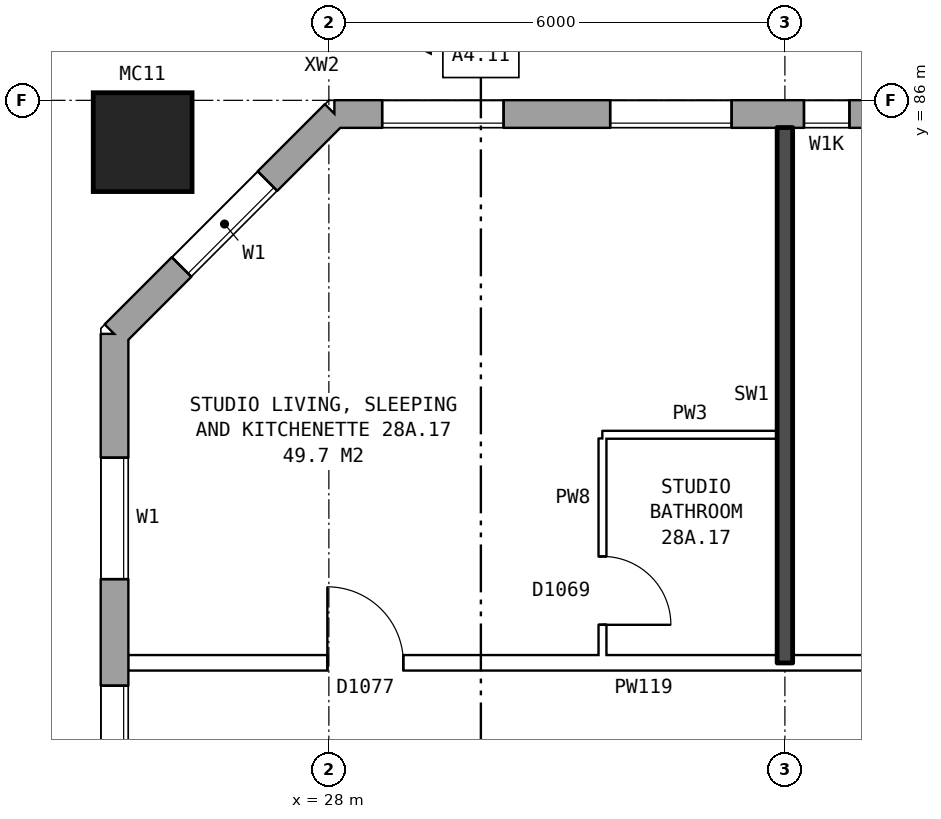
"""IFC4 building model, lengths in metres.
Left out: names, types, materials, properties, quantities, classifications, styles, units other than length and angle.
Written with IfcOpenShell. Run it as: python <this file> out.ifc"""

import sys

from ifc_helpers import new_model, si_unit, direction, frame, frame_2d, origin, origin_2d, place, context, subcontext, project, spatial, rectangle, hollow_rectangle, extrude, element, fill, save


model = new_model("IFC4")
c1 = context("Model", 3, precision=1e-05, world=origin(), true_north=direction((0.0, 1.0)))
c2 = subcontext(c1, "Body", "Model", "MODEL_VIEW")
j1 = project(units=[si_unit("LENGTHUNIT", "METRE"), si_unit("PLANEANGLEUNIT", "RADIAN")], contexts=[c1])
p1 = place(None, origin())
s1 = spatial("IfcSite", under=j1, at=p1, CompositionType="ELEMENT")
p2 = place(p1, origin())
s2 = spatial("IfcBuilding", under=s1, at=p2, CompositionType="ELEMENT")
p3 = place(p2, frame((0.0, 0.0, 102.6)))
s3 = spatial("IfcBuildingStorey", under=s2, at=p3, CompositionType="ELEMENT", Elevation=102.6)
p4 = place(p3, frame((25.55, 85.45, 0.0), z_axis=(0.0, 0.0, 1.0), x_axis=(1.0, 0.0, 0.0)))
e1 = element("IfcColumn", 1, at=p4, inside=s3, PredefinedType="COLUMN", context=c2, shape_type="SweptSolid", body=[
    extrude(hollow_rectangle(XDim=1.3, YDim=1.3, WallThickness=0.07, at=origin_2d()), origin(), (0.0, 0.0, 1.0), 3.1),
])
p5 = place(p3, frame((72.925, 85.82, 0.0), z_axis=(0.0, 0.0, 1.0), x_axis=(-1.0, 0.0, 0.0)))
e2 = element("IfcWall", 2, at=p5, inside=s3, PredefinedType="STANDARD", context=c2, shape_type="SweptSolid", body=[
    extrude(rectangle(XDim=44.851, YDim=0.36, at=frame_2d((22.425, 0.0))), origin(), (0.0, 0.0, 1.0), 2.85),
])
p6 = place(p5, frame((0.625, 0.0, 0.8)))
e3 = element("IfcOpeningElement", 3, at=p6, cuts=e2, PredefinedType="OPENING", context=c2, shape_type="SweptSolid", body=[
    extrude(rectangle(XDim=1.6, YDim=1.8, at=frame_2d((0.8, 0.9))), frame((0.0, 0.19, 0.0), z_axis=(0.0, -1.0, 0.0), x_axis=(1.0, 0.0, 0.0)), (0.0, 0.0, 1.0), 0.38),
])
p7 = place(p5, frame((3.625, 0.0, 0.8)))
e4 = element("IfcOpeningElement", 4, at=p7, cuts=e2, PredefinedType="OPENING", context=c2, shape_type="SweptSolid", body=[
    extrude(rectangle(XDim=1.6, YDim=1.8, at=frame_2d((0.8, 0.9))), frame((0.0, 0.19, 0.0), z_axis=(0.0, -1.0, 0.0), x_axis=(1.0, 0.0, 0.0)), (0.0, 0.0, 1.0), 0.38),
])
p8 = place(p5, frame((5.525, 0.0, 0.8)))
e5 = element("IfcOpeningElement", 5, at=p8, cuts=e2, PredefinedType="OPENING", context=c2, shape_type="SweptSolid", body=[
    extrude(rectangle(XDim=0.8, YDim=1.8, at=frame_2d((0.4, 0.9))), frame((0.0, 0.19, 0.0), z_axis=(0.0, -1.0, 0.0), x_axis=(1.0, 0.0, 0.0)), (0.0, 0.0, 1.0), 0.38),
])
p9 = place(p5, frame((9.125, 0.0, 0.8)))
e6 = element("IfcOpeningElement", 6, at=p9, cuts=e2, PredefinedType="OPENING", context=c2, shape_type="SweptSolid", body=[
    extrude(rectangle(XDim=0.6, YDim=0.9, at=frame_2d((0.3, 0.45))), frame((0.0, 0.19, 0.0), z_axis=(0.0, -1.0, 0.0), x_axis=(1.0, 0.0, 0.0)), (0.0, 0.0, 1.0), 0.38),
])
p10 = place(p5, frame((12.625, 0.0, 0.8)))
e7 = element("IfcOpeningElement", 7, at=p10, cuts=e2, PredefinedType="OPENING", context=c2, shape_type="SweptSolid", body=[
    extrude(rectangle(XDim=1.6, YDim=1.8, at=frame_2d((0.8, 0.9))), frame((0.0, 0.19, 0.0), z_axis=(0.0, -1.0, 0.0), x_axis=(1.0, 0.0, 0.0)), (0.0, 0.0, 1.0), 0.38),
])
p11 = place(p5, frame((15.625, 0.0, 0.8)))
e8 = element("IfcOpeningElement", 8, at=p11, cuts=e2, PredefinedType="OPENING", context=c2, shape_type="SweptSolid", body=[
    extrude(rectangle(XDim=1.6, YDim=1.8, at=frame_2d((0.8, 0.9))), frame((0.0, 0.19, 0.0), z_axis=(0.0, -1.0, 0.0), x_axis=(1.0, 0.0, 0.0)), (0.0, 0.0, 1.0), 0.38),
])
p12 = place(p5, frame((18.625, 0.0, 0.8)))
e9 = element("IfcOpeningElement", 9, at=p12, cuts=e2, PredefinedType="OPENING", context=c2, shape_type="SweptSolid", body=[
    extrude(rectangle(XDim=1.6, YDim=1.8, at=frame_2d((0.8, 0.9))), frame((0.0, 0.19, 0.0), z_axis=(0.0, -1.0, 0.0), x_axis=(1.0, 0.0, 0.0)), (0.0, 0.0, 1.0), 0.38),
])
p13 = place(p5, frame((21.625, 0.0, 0.8)))
e10 = element("IfcOpeningElement", 10, at=p13, cuts=e2, PredefinedType="OPENING", context=c2, shape_type="SweptSolid", body=[
    extrude(rectangle(XDim=1.6, YDim=1.8, at=frame_2d((0.8, 0.9))), frame((0.0, 0.19, 0.0), z_axis=(0.0, -1.0, 0.0), x_axis=(1.0, 0.0, 0.0)), (0.0, 0.0, 1.0), 0.38),
])
p14 = place(p5, frame((24.625, 0.0, 0.8)))
e11 = element("IfcOpeningElement", 11, at=p14, cuts=e2, PredefinedType="OPENING", context=c2, shape_type="SweptSolid", body=[
    extrude(rectangle(XDim=1.6, YDim=1.8, at=frame_2d((0.8, 0.9))), frame((0.0, 0.19, 0.0), z_axis=(0.0, -1.0, 0.0), x_axis=(1.0, 0.0, 0.0)), (0.0, 0.0, 1.0), 0.38),
])
p15 = place(p5, frame((27.625, 0.0, 0.8)))
e12 = element("IfcOpeningElement", 12, at=p15, cuts=e2, PredefinedType="OPENING", context=c2, shape_type="SweptSolid", body=[
    extrude(rectangle(XDim=1.6, YDim=1.8, at=frame_2d((0.8, 0.9))), frame((0.0, 0.19, 0.0), z_axis=(0.0, -1.0, 0.0), x_axis=(1.0, 0.0, 0.0)), (0.0, 0.0, 1.0), 0.38),
])
p16 = place(p5, frame((30.625, 0.0, 0.8)))
e13 = element("IfcOpeningElement", 13, at=p16, cuts=e2, PredefinedType="OPENING", context=c2, shape_type="SweptSolid", body=[
    extrude(rectangle(XDim=1.6, YDim=1.8, at=frame_2d((0.8, 0.9))), frame((0.0, 0.19, 0.0), z_axis=(0.0, -1.0, 0.0), x_axis=(1.0, 0.0, 0.0)), (0.0, 0.0, 1.0), 0.38),
])
p17 = place(p5, frame((33.125, 0.0, 0.8)))
e14 = element("IfcOpeningElement", 14, at=p17, cuts=e2, PredefinedType="OPENING", context=c2, shape_type="SweptSolid", body=[
    extrude(rectangle(XDim=1.4, YDim=1.8, at=frame_2d((0.7, 0.9))), frame((0.0, 0.19, 0.0), z_axis=(0.0, -1.0, 0.0), x_axis=(1.0, 0.0, 0.0)), (0.0, 0.0, 1.0), 0.38),
])
p18 = place(p5, frame((34.825, 0.0, 0.8)))
e15 = element("IfcOpeningElement", 15, at=p18, cuts=e2, PredefinedType="OPENING", context=c2, shape_type="SweptSolid", body=[
    extrude(rectangle(XDim=1.0, YDim=0.9, at=frame_2d((0.5, 0.45))), frame((0.0, 0.19, 0.0), z_axis=(0.0, -1.0, 0.0), x_axis=(1.0, 0.0, 0.0)), (0.0, 0.0, 1.0), 0.38),
])
p19 = place(p5, frame((39.625, 0.0, 0.8)))
e16 = element("IfcOpeningElement", 16, at=p19, cuts=e2, PredefinedType="OPENING", context=c2, shape_type="SweptSolid", body=[
    extrude(rectangle(XDim=1.6, YDim=1.8, at=frame_2d((0.8, 0.9))), frame((0.0, 0.19, 0.0), z_axis=(0.0, -1.0, 0.0), x_axis=(1.0, 0.0, 0.0)), (0.0, 0.0, 1.0), 0.38),
])
p20 = place(p5, frame((42.625, 0.0, 0.8)))
e17 = element("IfcOpeningElement", 17, at=p20, cuts=e2, PredefinedType="OPENING", context=c2, shape_type="SweptSolid", body=[
    extrude(rectangle(XDim=1.6, YDim=1.8, at=frame_2d((0.8, 0.9))), frame((0.0, 0.19, 0.0), z_axis=(0.0, -1.0, 0.0), x_axis=(1.0, 0.0, 0.0)), (0.0, 0.0, 1.0), 0.38),
])
p21 = place(p5, frame((6.625, 0.0, 1.7)))
e18 = element("IfcOpeningElement", 18, at=p21, cuts=e2, PredefinedType="OPENING", context=c2, shape_type="SweptSolid", body=[
    extrude(rectangle(XDim=1.0, YDim=0.9, at=frame_2d((0.5, 0.45))), frame((0.0, 0.19, 0.0), z_axis=(0.0, -1.0, 0.0), x_axis=(1.0, 0.0, 0.0)), (0.0, 0.0, 1.0), 0.38),
])
p22 = place(p5, frame((10.175, 0.0, 0.8)))
e19 = element("IfcOpeningElement", 19, at=p22, cuts=e2, PredefinedType="OPENING", context=c2, shape_type="SweptSolid", body=[
    extrude(rectangle(XDim=1.6, YDim=1.8, at=frame_2d((0.8, 0.9))), frame((0.0, 0.19, 0.0), z_axis=(0.0, -1.0, 0.0), x_axis=(1.0, 0.0, 0.0)), (0.0, 0.0, 1.0), 0.38),
])
p23 = place(p5, frame((37.175, 0.0, 1.7)))
e20 = element("IfcOpeningElement", 20, at=p23, cuts=e2, PredefinedType="OPENING", context=c2, shape_type="SweptSolid", body=[
    extrude(rectangle(XDim=0.6, YDim=0.9, at=frame_2d((0.3, 0.45))), frame((0.0, 0.19, 0.0), z_axis=(0.0, -1.0, 0.0), x_axis=(1.0, 0.0, 0.0)), (0.0, 0.0, 1.0), 0.38),
])
p24 = place(p5, frame((38.075, 0.0, 1.1)))
e21 = element("IfcOpeningElement", 21, at=p24, cuts=e2, PredefinedType="OPENING", context=c2, shape_type="SweptSolid", body=[
    extrude(rectangle(XDim=0.6, YDim=1.5, at=frame_2d((0.3, 0.75))), frame((0.0, 0.19, 0.0), z_axis=(0.0, -1.0, 0.0), x_axis=(1.0, 0.0, 0.0)), (0.0, 0.0, 1.0), 0.38),
])
p25 = place(p3, frame((28.075, 85.82, 0.0), z_axis=(0.0, 0.0, 1.0), x_axis=(-0.707106781187, -0.707106781187, 0.0)))
e22 = element("IfcWall", 22, at=p25, inside=s3, PredefinedType="STANDARD", context=c2, shape_type="SweptSolid", body=[
    extrude(rectangle(XDim=4.094, YDim=0.36, at=frame_2d((2.047, 0.0))), origin(), (0.0, 0.0, 1.0), 2.85),
])
p26 = place(p25, frame((1.247, 0.0, 0.8)))
e23 = element("IfcOpeningElement", 23, at=p26, cuts=e22, PredefinedType="OPENING", context=c2, shape_type="SweptSolid", body=[
    extrude(rectangle(XDim=1.6, YDim=1.8, at=frame_2d((0.8, 0.9))), frame((0.0, 0.19, 0.0), z_axis=(0.0, -1.0, 0.0), x_axis=(1.0, 0.0, 0.0)), (0.0, 0.0, 1.0), 0.38),
])
p27 = place(p3, frame((25.18, 82.925, 0.0), z_axis=(0.0, 0.0, 1.0), x_axis=(0.0, -1.0, 0.0)))
e24 = element("IfcWall", 24, at=p27, inside=s3, PredefinedType="STANDARD", context=c2, shape_type="SweptSolid", body=[
    extrude(rectangle(XDim=25.851, YDim=0.36, at=frame_2d((12.925, 0.0))), origin(), (0.0, 0.0, 1.0), 2.85),
])
p28 = place(p27, frame((1.625, 0.0, 0.8)))
e25 = element("IfcOpeningElement", 25, at=p28, cuts=e24, PredefinedType="OPENING", context=c2, shape_type="SweptSolid", body=[
    extrude(rectangle(XDim=1.6, YDim=1.8, at=frame_2d((0.8, 0.9))), frame((0.0, 0.19, 0.0), z_axis=(0.0, -1.0, 0.0), x_axis=(1.0, 0.0, 0.0)), (0.0, 0.0, 1.0), 0.38),
])
p29 = place(p27, frame((4.625, 0.0, 0.8)))
e26 = element("IfcOpeningElement", 26, at=p29, cuts=e24, PredefinedType="OPENING", context=c2, shape_type="SweptSolid", body=[
    extrude(rectangle(XDim=1.6, YDim=1.8, at=frame_2d((0.8, 0.9))), frame((0.0, 0.19, 0.0), z_axis=(0.0, -1.0, 0.0), x_axis=(1.0, 0.0, 0.0)), (0.0, 0.0, 1.0), 0.38),
])
p30 = place(p27, frame((7.625, 0.0, 0.8)))
e27 = element("IfcOpeningElement", 27, at=p30, cuts=e24, PredefinedType="OPENING", context=c2, shape_type="SweptSolid", body=[
    extrude(rectangle(XDim=1.6, YDim=1.8, at=frame_2d((0.8, 0.9))), frame((0.0, 0.19, 0.0), z_axis=(0.0, -1.0, 0.0), x_axis=(1.0, 0.0, 0.0)), (0.0, 0.0, 1.0), 0.38),
])
p31 = place(p27, frame((6.525, 0.0, 0.8)))
e28 = element("IfcOpeningElement", 28, at=p31, cuts=e24, PredefinedType="OPENING", context=c2, shape_type="SweptSolid", body=[
    extrude(rectangle(XDim=0.8, YDim=1.8, at=frame_2d((0.4, 0.9))), frame((0.0, 0.19, 0.0), z_axis=(0.0, -1.0, 0.0), x_axis=(1.0, 0.0, 0.0)), (0.0, 0.0, 1.0), 0.38),
])
p32 = place(p27, frame((9.525, 0.0, 1.7)))
e29 = element("IfcOpeningElement", 29, at=p32, cuts=e24, PredefinedType="OPENING", context=c2, shape_type="SweptSolid", body=[
    extrude(rectangle(XDim=0.8, YDim=0.9, at=frame_2d((0.4, 0.45))), frame((0.0, 0.19, 0.0), z_axis=(0.0, -1.0, 0.0), x_axis=(1.0, 0.0, 0.0)), (0.0, 0.0, 1.0), 0.38),
])
p33 = place(p27, frame((16.625, 0.0, 0.8)))
e30 = element("IfcOpeningElement", 30, at=p33, cuts=e24, PredefinedType="OPENING", context=c2, shape_type="SweptSolid", body=[
    extrude(rectangle(XDim=1.6, YDim=1.8, at=frame_2d((0.8, 0.9))), frame((0.0, 0.19, 0.0), z_axis=(0.0, -1.0, 0.0), x_axis=(1.0, 0.0, 0.0)), (0.0, 0.0, 1.0), 0.38),
])
p34 = place(p27, frame((19.625, 0.0, 0.8)))
e31 = element("IfcOpeningElement", 31, at=p34, cuts=e24, PredefinedType="OPENING", context=c2, shape_type="SweptSolid", body=[
    extrude(rectangle(XDim=1.6, YDim=1.8, at=frame_2d((0.8, 0.9))), frame((0.0, 0.19, 0.0), z_axis=(0.0, -1.0, 0.0), x_axis=(1.0, 0.0, 0.0)), (0.0, 0.0, 1.0), 0.38),
])
p35 = place(p27, frame((22.625, 0.0, 0.8)))
e32 = element("IfcOpeningElement", 32, at=p35, cuts=e24, PredefinedType="OPENING", context=c2, shape_type="SweptSolid", body=[
    extrude(rectangle(XDim=1.6, YDim=1.8, at=frame_2d((0.8, 0.9))), frame((0.0, 0.19, 0.0), z_axis=(0.0, -1.0, 0.0), x_axis=(1.0, 0.0, 0.0)), (0.0, 0.0, 1.0), 0.38),
])
p36 = place(p27, frame((11.425, 0.0, 0.8)))
e33 = element("IfcOpeningElement", 33, at=p36, cuts=e24, PredefinedType="OPENING", context=c2, shape_type="SweptSolid", body=[
    extrude(rectangle(XDim=0.6, YDim=0.9, at=frame_2d((0.3, 0.45))), frame((0.0, 0.19, 0.0), z_axis=(0.0, -1.0, 0.0), x_axis=(1.0, 0.0, 0.0)), (0.0, 0.0, 1.0), 0.38),
])
p37 = place(p27, frame((12.325, 0.0, 0.8)))
e34 = element("IfcOpeningElement", 34, at=p37, cuts=e24, PredefinedType="OPENING", context=c2, shape_type="SweptSolid", body=[
    extrude(rectangle(XDim=1.2, YDim=1.8, at=frame_2d((0.6, 0.9))), frame((0.0, 0.19, 0.0), z_axis=(0.0, -1.0, 0.0), x_axis=(1.0, 0.0, 0.0)), (0.0, 0.0, 1.0), 0.38),
])
p38 = place(p27, frame((13.825, 0.0, 0.8)))
e35 = element("IfcOpeningElement", 35, at=p38, cuts=e24, PredefinedType="OPENING", context=c2, shape_type="SweptSolid", body=[
    extrude(rectangle(XDim=0.6, YDim=0.9, at=frame_2d((0.3, 0.45))), frame((0.0, 0.19, 0.0), z_axis=(0.0, -1.0, 0.0), x_axis=(1.0, 0.0, 0.0)), (0.0, 0.0, 1.0), 0.38),
])
p39 = place(p27, frame((15.525, 0.0, 1.7)))
e36 = element("IfcOpeningElement", 36, at=p39, cuts=e24, PredefinedType="OPENING", context=c2, shape_type="SweptSolid", body=[
    extrude(rectangle(XDim=0.6, YDim=0.9, at=frame_2d((0.3, 0.45))), frame((0.0, 0.19, 0.0), z_axis=(0.0, -1.0, 0.0), x_axis=(1.0, 0.0, 0.0)), (0.0, 0.0, 1.0), 0.38),
])
p40 = place(p27, frame((18.525, 0.0, 0.8)))
e37 = element("IfcOpeningElement", 37, at=p40, cuts=e24, PredefinedType="OPENING", context=c2, shape_type="SweptSolid", body=[
    extrude(rectangle(XDim=0.8, YDim=1.8, at=frame_2d((0.4, 0.9))), frame((0.0, 0.19, 0.0), z_axis=(0.0, -1.0, 0.0), x_axis=(1.0, 0.0, 0.0)), (0.0, 0.0, 1.0), 0.38),
])
p41 = place(p3, frame((25.36, 78.6, 0.0), z_axis=(0.0, 0.0, 1.0), x_axis=(1.0, 0.0, 0.0)))
e38 = element("IfcWall", 38, at=p41, inside=s3, PredefinedType="PARTITIONING", context=c2, shape_type="SweptSolid", body=[
    extrude(rectangle(XDim=20.54, YDim=0.2, at=frame_2d((10.27, 0.0))), origin(), (0.0, 0.0, 1.0), 2.85),
])
p42 = place(p41, frame((15.94, 0.0, 0.0)))
e39 = element("IfcOpeningElement", 39, at=p42, cuts=e38, PredefinedType="OPENING", context=c2, shape_type="SweptSolid", body=[
    extrude(rectangle(XDim=1.0, YDim=2.1, at=frame_2d((0.5, 1.05))), frame((0.0, 0.11, 0.0), z_axis=(0.0, -1.0, 0.0), x_axis=(1.0, 0.0, 0.0)), (0.0, 0.0, 1.0), 0.22),
])
p43 = place(p41, frame((9.94, 0.0, 0.0)))
e40 = element("IfcOpeningElement", 40, at=p43, cuts=e38, PredefinedType="OPENING", context=c2, shape_type="SweptSolid", body=[
    extrude(rectangle(XDim=1.0, YDim=2.1, at=frame_2d((0.5, 1.05))), frame((0.0, 0.11, 0.0), z_axis=(0.0, -1.0, 0.0), x_axis=(1.0, 0.0, 0.0)), (0.0, 0.0, 1.0), 0.22),
])
p44 = place(p41, frame((2.62, 0.0, 0.0)))
e41 = element("IfcOpeningElement", 41, at=p44, cuts=e38, PredefinedType="OPENING", context=c2, shape_type="SweptSolid", body=[
    extrude(rectangle(XDim=1.0, YDim=2.1, at=frame_2d((0.5, 1.05))), frame((0.0, 0.11, 0.0), z_axis=(0.0, -1.0, 0.0), x_axis=(1.0, 0.0, 0.0)), (0.0, 0.0, 1.0), 0.22),
])
p45 = place(p3, frame((31.6, 81.6, 0.0), z_axis=(0.0, 0.0, 1.0), x_axis=(1.0, 0.0, 0.0)))
e42 = element("IfcWall", 42, at=p45, inside=s3, PredefinedType="PARTITIONING", context=c2, shape_type="SweptSolid", body=[
    extrude(rectangle(XDim=2.3, YDim=0.1, at=frame_2d((1.15, 0.0))), origin(), (0.0, 0.0, 1.0), 2.85),
])
p46 = place(p3, frame((31.6, 78.7, 0.0), z_axis=(0.0, 0.0, 1.0), x_axis=(0.0, 1.0, 0.0)))
e43 = element("IfcWall", 43, at=p46, inside=s3, PredefinedType="PARTITIONING", context=c2, shape_type="SweptSolid", body=[
    extrude(rectangle(XDim=2.85, YDim=0.1, at=frame_2d((1.425, 0.0))), origin(), (0.0, 0.0, 1.0), 2.85),
])
p47 = place(p46, frame((0.4, 0.0, 0.0)))
e44 = element("IfcOpeningElement", 44, at=p47, cuts=e43, PredefinedType="OPENING", context=c2, shape_type="SweptSolid", body=[
    extrude(rectangle(XDim=0.9, YDim=2.1, at=frame_2d((0.45, 1.05))), frame((0.0, 0.06, 0.0), z_axis=(0.0, -1.0, 0.0), x_axis=(1.0, 0.0, 0.0)), (0.0, 0.0, 1.0), 0.12),
])
p48 = place(p3, frame((34.0, 78.6, 0.0), z_axis=(0.0, 0.0, 1.0), x_axis=(0.0, 1.0, 0.0)))
e45 = element("IfcWall", 45, at=p48, inside=s3, PredefinedType="SOLIDWALL", context=c2, shape_type="SweptSolid", body=[
    extrude(rectangle(XDim=7.04, YDim=0.2, at=frame_2d((3.52, 0.0))), origin(), (0.0, 0.0, 1.0), 2.85),
])
p49 = place(p19, origin())
e46 = element("IfcWindow", 46, at=p49, inside=s3, PartitioningType="SINGLE_PANEL", PredefinedType="WINDOW", context=c2, shape_type="SweptSolid", body=[
    extrude(rectangle(XDim=1.6, YDim=1.8, at=frame_2d((0.8, 0.9))), frame((0.0, 0.15, 0.0), z_axis=(0.0, -1.0, 0.0), x_axis=(1.0, 0.0, 0.0)), (0.0, 0.0, 1.0), 0.06),
])
fill(e16, e46)
p50 = place(p20, origin())
e47 = element("IfcWindow", 47, at=p50, inside=s3, PartitioningType="SINGLE_PANEL", PredefinedType="WINDOW", context=c2, shape_type="SweptSolid", body=[
    extrude(rectangle(XDim=1.6, YDim=1.8, at=frame_2d((0.8, 0.9))), frame((0.0, 0.15, 0.0), z_axis=(0.0, -1.0, 0.0), x_axis=(1.0, 0.0, 0.0)), (0.0, 0.0, 1.0), 0.06),
])
fill(e17, e47)
p51 = place(p26, origin())
e48 = element("IfcWindow", 48, at=p51, inside=s3, PartitioningType="SINGLE_PANEL", PredefinedType="WINDOW", context=c2, shape_type="SweptSolid", body=[
    extrude(rectangle(XDim=1.6, YDim=1.8, at=frame_2d((0.8, 0.9))), frame((0.0, 0.15, 0.0), z_axis=(0.0, -1.0, 0.0), x_axis=(1.0, 0.0, 0.0)), (0.0, 0.0, 1.0), 0.06),
])
fill(e23, e48)
p52 = place(p28, origin())
e49 = element("IfcWindow", 49, at=p52, inside=s3, PartitioningType="SINGLE_PANEL", PredefinedType="WINDOW", context=c2, shape_type="SweptSolid", body=[
    extrude(rectangle(XDim=1.6, YDim=1.8, at=frame_2d((0.8, 0.9))), frame((0.0, 0.15, 0.0), z_axis=(0.0, -1.0, 0.0), x_axis=(1.0, 0.0, 0.0)), (0.0, 0.0, 1.0), 0.06),
])
fill(e25, e49)
p53 = place(p29, origin())
e50 = element("IfcWindow", 50, at=p53, inside=s3, PartitioningType="SINGLE_PANEL", PredefinedType="WINDOW", context=c2, shape_type="SweptSolid", body=[
    extrude(rectangle(XDim=1.6, YDim=1.8, at=frame_2d((0.8, 0.9))), frame((0.0, 0.15, 0.0), z_axis=(0.0, -1.0, 0.0), x_axis=(1.0, 0.0, 0.0)), (0.0, 0.0, 1.0), 0.06),
])
fill(e26, e50)
p54 = place(p44, origin())
e51 = element("IfcDoor", 51, at=p54, inside=s3, OperationType="SINGLE_SWING_LEFT", PredefinedType="DOOR", context=c2, shape_type="SweptSolid", body=[
    extrude(rectangle(XDim=1.0, YDim=2.1, at=frame_2d((0.5, 1.05))), frame((0.0, 0.025, 0.0), z_axis=(0.0, -1.0, 0.0), x_axis=(1.0, 0.0, 0.0)), (0.0, 0.0, 1.0), 0.05),
])
fill(e41, e51)
p55 = place(p47, frame((0.9, 0.0, 0.0), z_axis=(0.0, 0.0, 1.0), x_axis=(-1.0, 0.0, 0.0)))
e52 = element("IfcDoor", 52, at=p55, inside=s3, OperationType="SINGLE_SWING_RIGHT", PredefinedType="DOOR", context=c2, shape_type="SweptSolid", body=[
    extrude(rectangle(XDim=0.9, YDim=2.1, at=frame_2d((0.45, 1.05))), frame((0.0, 0.025, 0.0), z_axis=(0.0, -1.0, 0.0), x_axis=(1.0, 0.0, 0.0)), (0.0, 0.0, 1.0), 0.05),
])
fill(e44, e52)
p56 = place(p24, origin())
e53 = element("IfcWindow", 53, at=p56, inside=s3, PartitioningType="SINGLE_PANEL", PredefinedType="WINDOW", context=c2, shape_type="SweptSolid", body=[
    extrude(rectangle(XDim=0.6, YDim=1.5, at=frame_2d((0.3, 0.75))), frame((0.0, 0.15, 0.0), z_axis=(0.0, -1.0, 0.0), x_axis=(1.0, 0.0, 0.0)), (0.0, 0.0, 1.0), 0.06),
])
fill(e21, e53)
save(model, sys.argv[1])
